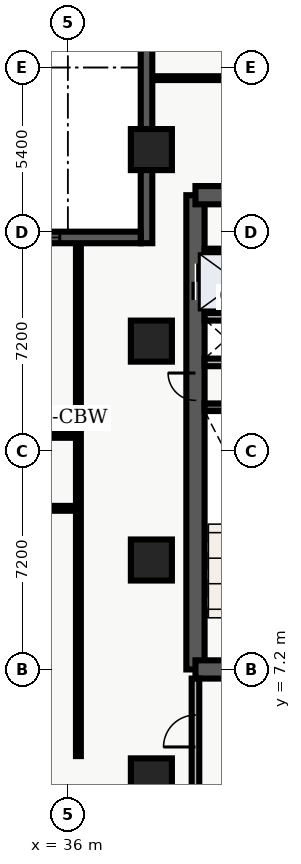
"""IFC4 building model, lengths in metres.
Left out: names, types, materials, properties, quantities, classifications, styles, units other than length and angle.
Written with IfcOpenShell. Run it as: python <this file> out.ifc"""

import sys

from ifc_helpers import new_model, entity, si_unit, converted_unit, direction, frame, origin_with_axes, origin_2d_with_axis, place, context, subcontext, project, spatial, polyline, rectangle, outline, extrude, element, fill, save


model = new_model("IFC4")
c1 = context("Model", 3, precision=1e-05, world=origin_with_axes(), true_north=direction((0.0, 1.0)))
c2 = subcontext(c1, "Body", "Model", "MODEL_VIEW")
j1 = project(units=[si_unit("LENGTHUNIT", "METRE"), converted_unit("PLANEANGLEUNIT", "DEGREE", entity("IfcPlaneAngleMeasure", 0.017), si_unit("PLANEANGLEUNIT", "RADIAN"), dimensions=[0, 0, 0, 0, 0, 0, 0])], contexts=[c1])
p1 = place(None, origin_with_axes())
s1 = spatial("IfcSite", under=j1, at=p1, CompositionType="ELEMENT")
p2 = place(p1, origin_with_axes())
s2 = spatial("IfcBuilding", under=s1, at=p2, CompositionType="ELEMENT")
p3 = place(p2, frame((0.0, 0.0, 28.8), z_axis=(0.0, 0.0, 1.0), x_axis=(1.0, 0.0, 0.0)))
s3 = spatial("IfcBuildingStorey", under=s2, at=p3, CompositionType="ELEMENT", Elevation=28.8)
p4 = place(p3, frame((40.2, 7.2, 0.0), z_axis=(0.0, 0.0, 1.0), x_axis=(0.0, 1.0, 0.0)))
e1 = element("IfcWall", 1, at=p4, inside=s3, PredefinedType="SHEAR", context=c2, shape_type="SweptSolid", body=[
    extrude(outline(polyline([(0.0, -0.3), (15.6, -0.3), (15.6, 0.3), (0.0, 0.3), (0.0, -0.3)])), origin_with_axes(), (0.0, 0.0, 1.0), 3.66),
])
p5 = place(p4, frame((12.75, 0.0, 0.0), z_axis=(0.0, 0.0, 1.0), x_axis=(1.0, 0.0, 0.0)))
e2 = element("IfcOpeningElement", 2, at=p5, cuts=e1, PredefinedType="OPENING", context=c2, shape_type="SweptSolid", body=[
    extrude(rectangle(XDim=1.2, YDim=0.62, at=origin_2d_with_axis()), origin_with_axes(), (0.0, 0.0, 1.0), 2.15),
])
p6 = place(p4, frame((9.3, 0.0, 0.0), z_axis=(0.0, 0.0, 1.0), x_axis=(1.0, 0.0, 0.0)))
e3 = element("IfcOpeningElement", 3, at=p6, cuts=e1, PredefinedType="OPENING", context=c2, shape_type="SweptSolid", body=[
    extrude(rectangle(XDim=0.9, YDim=0.62, at=origin_2d_with_axis()), origin_with_axes(), (0.0, 0.0, 1.0), 2.15),
])
p7 = place(p3, frame((40.2, 7.2, 0.0), z_axis=(0.0, 0.0, 1.0), x_axis=(1.0, 0.0, 0.0)))
e4 = element("IfcWall", 4, at=p7, inside=s3, PredefinedType="SHEAR", context=c2, shape_type="SweptSolid", body=[
    extrude(outline(polyline([(0.0, -0.3), (7.85, -0.3), (7.85, 0.3), (0.0, 0.3), (0.0, -0.3)])), origin_with_axes(), (0.0, 0.0, 1.0), 3.66),
])
p8 = place(p7, frame((2.175, 0.0, 0.0), z_axis=(0.0, 0.0, 1.0), x_axis=(1.0, 0.0, 0.0)))
e5 = element("IfcOpeningElement", 5, at=p8, cuts=e4, PredefinedType="OPENING", context=c2, shape_type="SweptSolid", body=[
    extrude(rectangle(XDim=1.05, YDim=0.62, at=origin_2d_with_axis()), origin_with_axes(), (0.0, 0.0, 1.0), 2.15),
])
p9 = place(p3, frame((40.2, 22.8, 0.0), z_axis=(0.0, 0.0, 1.0), x_axis=(1.0, 0.0, 0.0)))
e6 = element("IfcWall", 6, at=p9, inside=s3, PredefinedType="SHEAR", context=c2, shape_type="SweptSolid", body=[
    extrude(outline(polyline([(0.0, -0.3), (7.85, -0.3), (7.85, 0.3), (0.0, 0.3), (0.0, -0.3)])), origin_with_axes(), (0.0, 0.0, 1.0), 3.66),
])
p10 = place(p9, frame((5.775, 0.0, 0.0), z_axis=(0.0, 0.0, 1.0), x_axis=(1.0, 0.0, 0.0)))
e7 = element("IfcOpeningElement", 7, at=p10, cuts=e6, PredefinedType="OPENING", context=c2, shape_type="SweptSolid", body=[
    extrude(rectangle(XDim=1.05, YDim=0.62, at=origin_2d_with_axis()), origin_with_axes(), (0.0, 0.0, 1.0), 2.15),
])
p11 = place(p9, frame((2.15, 0.0, 0.0), z_axis=(0.0, 0.0, 1.0), x_axis=(1.0, 0.0, 0.0)))
e8 = element("IfcOpeningElement", 8, at=p11, cuts=e6, PredefinedType="OPENING", context=c2, shape_type="SweptSolid", body=[
    extrude(rectangle(XDim=0.9, YDim=0.62, at=origin_2d_with_axis()), origin_with_axes(), (0.0, 0.0, 1.0), 2.15),
])
p12 = place(p3, frame((40.5, 15.825, 0.0), z_axis=(0.0, 0.0, 1.0), x_axis=(1.0, 0.0, 0.0)))
e9 = element("IfcWall", 9, at=p12, inside=s3, PredefinedType="SHEAR", context=c2, shape_type="SweptSolid", body=[
    extrude(outline(polyline([(0.0, -0.125), (3.5, -0.125), (3.5, 0.125), (0.0, 0.125), (0.0, -0.125)])), origin_with_axes(), (0.0, 0.0, 1.0), 3.66),
])
p13 = place(p3, frame((40.5, 17.3, 0.0), z_axis=(0.0, 0.0, 1.0), x_axis=(1.0, 0.0, 0.0)))
e10 = element("IfcWall", 10, at=p13, inside=s3, PredefinedType="SOLIDWALL", context=c2, shape_type="SweptSolid", body=[
    extrude(outline(polyline([(0.0, -0.125), (3.5, -0.125), (3.5, 0.125), (0.0, 0.125), (0.0, -0.125)])), origin_with_axes(), (0.0, 0.0, 1.0), 2.7),
])
p14 = place(p13, frame((2.4, 0.0, 0.0), z_axis=(0.0, 0.0, 1.0), x_axis=(1.0, 0.0, 0.0)))
e11 = element("IfcOpeningElement", 11, at=p14, cuts=e10, PredefinedType="OPENING", context=c2, shape_type="SweptSolid", body=[
    extrude(rectangle(XDim=0.9, YDim=0.27, at=origin_2d_with_axis()), origin_with_axes(), (0.0, 0.0, 1.0), 2.15),
])
p15 = place(p3, frame((40.5, 18.8, 0.0), z_axis=(0.0, 0.0, 1.0), x_axis=(1.0, 0.0, 0.0)))
e12 = element("IfcWall", 12, at=p15, inside=s3, PredefinedType="SOLIDWALL", context=c2, shape_type="SweptSolid", body=[
    extrude(outline(polyline([(0.0, -0.125), (3.5, -0.125), (3.5, 0.125), (0.0, 0.125), (0.0, -0.125)])), origin_with_axes(), (0.0, 0.0, 1.0), 2.7),
])
p16 = place(p3, frame((40.2, 3.1, 0.0), z_axis=(0.0, 0.0, 1.0), x_axis=(0.0, 1.0, 0.0)))
e13 = element("IfcWall", 13, at=p16, inside=s3, PredefinedType="SOLIDWALL", context=c2, shape_type="SweptSolid", body=[
    extrude(outline(polyline([(0.0, -0.125), (3.8, -0.125), (3.8, 0.125), (0.0, 0.125), (0.0, -0.125)])), origin_with_axes(), (0.0, 0.0, 1.0), 2.7),
])
p17 = place(p16, frame((2.075, 0.0, 0.0), z_axis=(0.0, 0.0, 1.0), x_axis=(1.0, 0.0, 0.0)))
e14 = element("IfcOpeningElement", 14, at=p17, cuts=e13, PredefinedType="OPENING", context=c2, shape_type="SweptSolid", body=[
    extrude(rectangle(XDim=1.05, YDim=0.27, at=origin_2d_with_axis()), origin_with_axes(), (0.0, 0.0, 1.0), 2.15),
])
for number, where, z_axis, x_axis in (
    (15, (38.75, 3.6, 0.0), (0.0, 0.0, 1.0), (1.0, 0.0, 0.0)),
    (16, (38.75, 10.8, 0.0), (0.0, 0.0, 1.0), (1.0, 0.0, 0.0)),
    (17, (38.75, 18.0, 0.0), (0.0, 0.0, 1.0), (1.0, 0.0, 0.0)),
    (18, (38.75, 24.3, 0.0), (0.0, 0.0, 1.0), (1.0, 0.0, 0.0)),
):
    element("IfcColumn", number, at=place(p3, frame(where, z_axis=z_axis, x_axis=x_axis)), inside=s3, PredefinedType="COLUMN", context=c2, shape_type="SweptSolid", body=[
        extrude(rectangle(XDim=1.35, YDim=1.35, at=origin_2d_with_axis()), origin_with_axes(), (0.0, 0.0, 1.0), 3.9),
    ])
p18 = place(p3, frame((40.5, 20.96, 0.0), z_axis=(0.0, 0.0, 1.0), x_axis=(1.0, 0.0, 0.0)))
e19 = element("IfcWall", 19, at=p18, inside=s3, PredefinedType="PARTITIONING", context=c2, shape_type="SweptSolid", body=[
    extrude(outline(polyline([(0.0, -0.08), (3.5, -0.08), (3.5, 0.08), (0.0, 0.08), (0.0, -0.08)])), origin_with_axes(), (0.0, 0.0, 1.0), 2.7),
])
p19 = place(p3, frame((21.15, 12.5, 0.0), z_axis=(0.0, 0.0, 1.0), x_axis=(1.0, 0.0, 0.0)))
e20 = element("IfcWall", 20, at=p19, inside=s3, PredefinedType="PARTITIONING", context=c2, shape_type="SweptSolid", body=[
    extrude(outline(polyline([(0.0, -0.08), (15.2, -0.08), (15.2, 0.08), (0.0, 0.08), (0.0, -0.08)])), origin_with_axes(), (0.0, 0.0, 1.0), 2.7),
])
p20 = place(p19, frame((3.508, 0.0, 0.0), z_axis=(0.0, 0.0, 1.0), x_axis=(1.0, 0.0, 0.0)))
e21 = element("IfcOpeningElement", 21, at=p20, cuts=e20, PredefinedType="OPENING", context=c2, shape_type="SweptSolid", body=[
    extrude(rectangle(XDim=1.0, YDim=0.18, at=origin_2d_with_axis()), origin_with_axes(), (0.0, 0.0, 1.0), 2.15),
])
p21 = place(p19, frame((10.978, 0.0, 0.0), z_axis=(0.0, 0.0, 1.0), x_axis=(1.0, 0.0, 0.0)))
e22 = element("IfcOpeningElement", 22, at=p21, cuts=e20, PredefinedType="OPENING", context=c2, shape_type="SweptSolid", body=[
    extrude(rectangle(XDim=1.2, YDim=0.18, at=origin_2d_with_axis()), origin_with_axes(), (0.0, 0.0, 1.0), 2.2),
])
p22 = place(p3, frame((21.15, 14.9, 0.0), z_axis=(0.0, 0.0, 1.0), x_axis=(1.0, 0.0, 0.0)))
e23 = element("IfcWall", 23, at=p22, inside=s3, PredefinedType="PARTITIONING", context=c2, shape_type="SweptSolid", body=[
    extrude(outline(polyline([(0.0, -0.08), (15.2, -0.08), (15.2, 0.08), (0.0, 0.08), (0.0, -0.08)])), origin_with_axes(), (0.0, 0.0, 1.0), 2.7),
])
p23 = place(p22, frame((3.49, 0.0, 0.0), z_axis=(0.0, 0.0, 1.0), x_axis=(1.0, 0.0, 0.0)))
e24 = element("IfcOpeningElement", 24, at=p23, cuts=e23, PredefinedType="OPENING", context=c2, shape_type="SweptSolid", body=[
    extrude(rectangle(XDim=1.0, YDim=0.18, at=origin_2d_with_axis()), origin_with_axes(), (0.0, 0.0, 1.0), 2.15),
])
p24 = place(p22, frame((10.96, 0.0, 0.0), z_axis=(0.0, 0.0, 1.0), x_axis=(1.0, 0.0, 0.0)))
e25 = element("IfcOpeningElement", 25, at=p24, cuts=e23, PredefinedType="OPENING", context=c2, shape_type="SweptSolid", body=[
    extrude(rectangle(XDim=1.0, YDim=0.18, at=origin_2d_with_axis()), origin_with_axes(), (0.0, 0.0, 1.0), 2.15),
])
p25 = place(p3, frame((36.35, 4.35, 0.0), z_axis=(0.0, 0.0, 1.0), x_axis=(0.0, 1.0, 0.0)))
e26 = element("IfcWall", 26, at=p25, inside=s3, PredefinedType="PARTITIONING", context=c2, shape_type="SweptSolid", body=[
    extrude(outline(polyline([(0.0, -0.08), (16.95, -0.08), (16.95, 0.08), (0.0, 0.08), (0.0, -0.08)])), origin_with_axes(), (0.0, 0.0, 1.0), 2.7),
])
p26 = place(p3, frame((38.76, 26.65, 0.0), z_axis=(0.0, 0.0, 1.0), x_axis=(1.0, 0.0, 0.0)))
e27 = element("IfcWall", 27, at=p26, inside=s3, PredefinedType="PARTITIONING", context=c2, shape_type="SweptSolid", body=[
    extrude(outline(polyline([(0.0, -0.062), (20.88, -0.062), (20.88, 0.062), (0.0, 0.062), (0.0, -0.062)])), origin_with_axes(), (0.0, 0.0, 1.0), 2.7),
])
p27 = place(p26, frame((4.24, 0.0, 0.0), z_axis=(0.0, 0.0, 1.0), x_axis=(1.0, 0.0, 0.0)))
e28 = element("IfcOpeningElement", 28, at=p27, cuts=e27, PredefinedType="OPENING", context=c2, shape_type="SweptSolid", body=[
    extrude(rectangle(XDim=1.0, YDim=0.145, at=origin_2d_with_axis()), origin_with_axes(), (0.0, 0.0, 1.0), 2.15),
])
p28 = place(p3, frame((38.59, 21.22, 0.0), z_axis=(0.0, 0.0, 1.0), x_axis=(0.0, 1.0, 0.0)))
e29 = element("IfcWall", 29, at=p28, inside=s3, PredefinedType="SOLIDWALL", context=c2, shape_type="SweptSolid", body=[
    extrude(outline(polyline([(0.0, -0.19), (7.58, -0.19), (7.58, 0.19), (0.0, 0.19), (0.0, -0.19)])), origin_with_axes(), (0.0, 0.0, 1.0), 3.66),
])
p29 = place(p3, frame((21.22, 21.41, 0.0), z_axis=(0.0, 0.0, 1.0), x_axis=(1.0, 0.0, 0.0)))
e30 = element("IfcWall", 30, at=p29, inside=s3, PredefinedType="SOLIDWALL", context=c2, shape_type="SweptSolid", body=[
    extrude(outline(polyline([(0.0, -0.19), (17.18, -0.19), (17.18, 0.19), (0.0, 0.19), (0.0, -0.19)])), origin_with_axes(), (0.0, 0.0, 1.0), 3.66),
])
p30 = place(p29, frame((3.263, 0.0, 0.45), z_axis=(0.0, 0.0, 1.0), x_axis=(1.0, 0.0, 0.0)))
e31 = element("IfcOpeningElement", 31, at=p30, cuts=e30, PredefinedType="OPENING", context=c2, shape_type="SweptSolid", body=[
    extrude(rectangle(XDim=2.1, YDim=0.4, at=origin_2d_with_axis()), origin_with_axes(), (0.0, 0.0, 1.0), 2.2),
])
p31 = place(p29, frame((8.59, 0.0, 0.45), z_axis=(0.0, 0.0, 1.0), x_axis=(1.0, 0.0, 0.0)))
e32 = element("IfcOpeningElement", 32, at=p31, cuts=e30, PredefinedType="OPENING", context=c2, shape_type="SweptSolid", body=[
    extrude(rectangle(XDim=2.1, YDim=0.4, at=origin_2d_with_axis()), origin_with_axes(), (0.0, 0.0, 1.0), 2.2),
])
p32 = place(p29, frame((13.467, 0.0, 0.45), z_axis=(0.0, 0.0, 1.0), x_axis=(1.0, 0.0, 0.0)))
e33 = element("IfcOpeningElement", 33, at=p32, cuts=e30, PredefinedType="OPENING", context=c2, shape_type="SweptSolid", body=[
    extrude(rectangle(XDim=2.1, YDim=0.4, at=origin_2d_with_axis()), origin_with_axes(), (0.0, 0.0, 1.0), 2.2),
])
p33 = place(p4, frame((12.75, 0.0, 0.0), z_axis=(0.0, 0.0, 1.0), x_axis=(1.0, 0.0, 0.0)))
e34 = element("IfcDoor", 34, at=p33, inside=s3, OperationType="DOUBLE_DOOR_SLIDING", PredefinedType="DOOR", context=c2, shape_type="SweptSolid", body=[
    extrude(rectangle(XDim=1.2, YDim=0.09, at=origin_2d_with_axis()), origin_with_axes(), (0.0, 0.0, 1.0), 2.15),
])
fill(e2, e34)
p34 = place(p4, frame((9.3, 0.0, 0.0), z_axis=(0.0, 0.0, 1.0), x_axis=(1.0, 0.0, 0.0)))
e35 = element("IfcDoor", 35, at=p34, inside=s3, OperationType="SINGLE_SWING_RIGHT", PredefinedType="DOOR", context=c2, shape_type="SweptSolid", body=[
    extrude(rectangle(XDim=0.9, YDim=0.09, at=origin_2d_with_axis()), origin_with_axes(), (0.0, 0.0, 1.0), 2.15),
])
fill(e3, e35)
p35 = place(p16, frame((2.075, 0.0, 0.0), z_axis=(0.0, 0.0, 1.0), x_axis=(1.0, 0.0, 0.0)))
e36 = element("IfcDoor", 36, at=p35, inside=s3, OperationType="SINGLE_SWING_LEFT", PredefinedType="DOOR", context=c2, shape_type="SweptSolid", body=[
    extrude(rectangle(XDim=1.05, YDim=0.09, at=origin_2d_with_axis()), origin_with_axes(), (0.0, 0.0, 1.0), 2.15),
])
fill(e14, e36)
p36 = place(p29, frame((13.467, 0.0, 0.45), z_axis=(0.0, 0.0, 1.0), x_axis=(1.0, 0.0, 0.0)))
e37 = element("IfcWindow", 37, at=p36, inside=s3, PredefinedType="WINDOW", context=c2, shape_type="SweptSolid", body=[
    extrude(rectangle(XDim=2.1, YDim=0.09, at=origin_2d_with_axis()), origin_with_axes(), (0.0, 0.0, 1.0), 2.2),
])
fill(e33, e37)
save(model, sys.argv[1])
